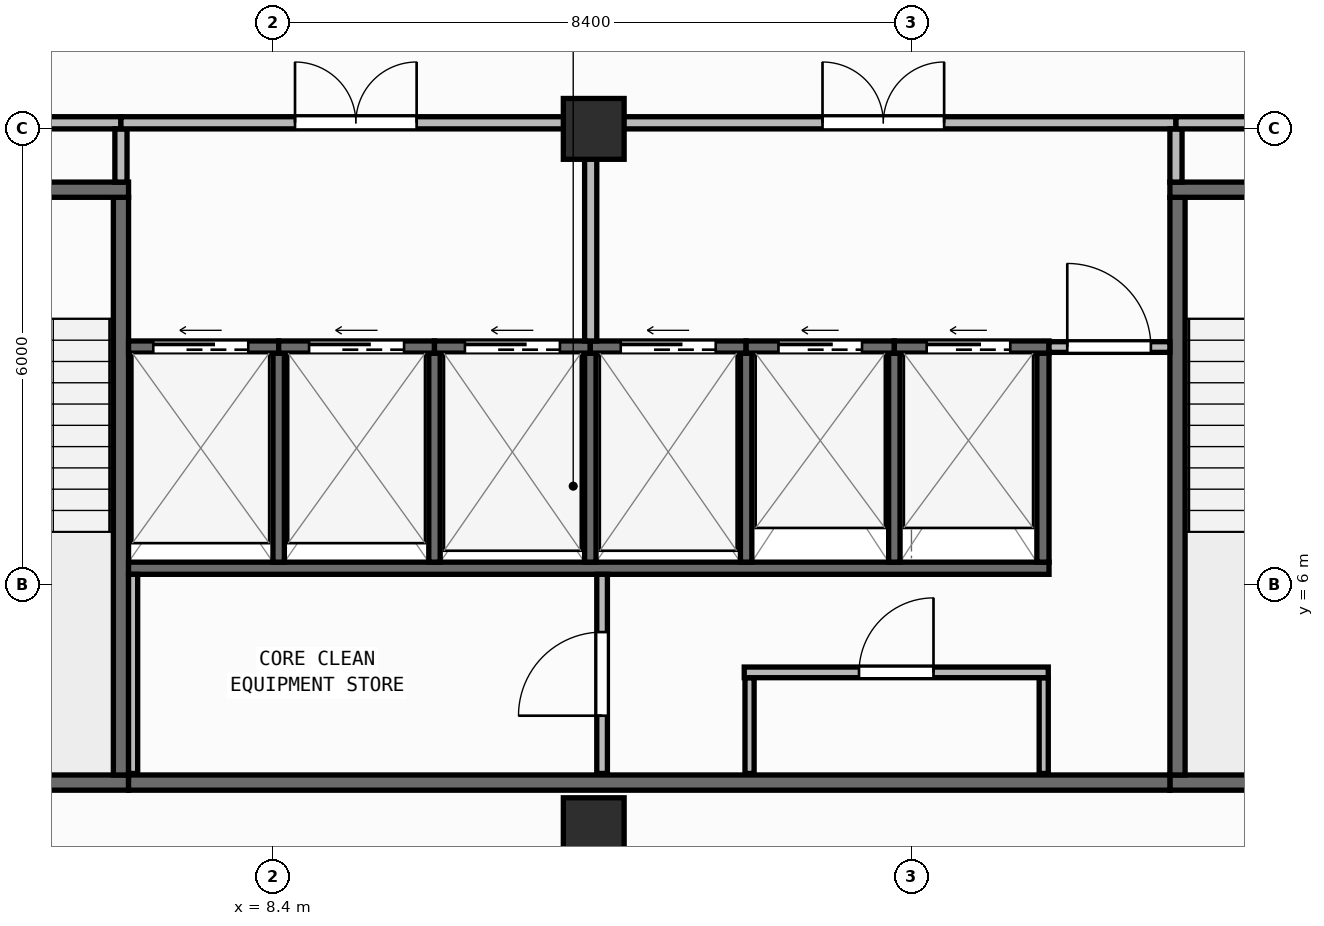
"""IFC4 building model, lengths in metres.
Left out: names, types, materials, properties, quantities, classifications, styles, units other than length and angle.
Written with IfcOpenShell. Run it as: python <this file> out.ifc"""

import sys

from ifc_helpers import new_model, si_unit, direction, frame, frame_2d, origin, origin_2d, place, context, subcontext, project, spatial, rectangle, extrude, element, fill, save


model = new_model("IFC4")
c1 = context("Model", 3, precision=1e-05, world=origin(), true_north=direction((0.0, 1.0)))
c2 = subcontext(c1, "Body", "Model", "MODEL_VIEW")
j1 = project(units=[si_unit("LENGTHUNIT", "METRE"), si_unit("PLANEANGLEUNIT", "RADIAN")], contexts=[c1])
p1 = place(None, origin())
s1 = spatial("IfcSite", under=j1, at=p1, CompositionType="ELEMENT")
p2 = place(p1, origin())
s2 = spatial("IfcBuilding", under=s1, at=p2, CompositionType="ELEMENT")
p3 = place(p2, frame((0.0, 0.0, 268.4)))
s3 = spatial("IfcBuildingStorey", under=s2, at=p3, CompositionType="ELEMENT", Elevation=268.4)
for number, where, z_axis, x_axis in (
    (1, (12.62, 2.8, 0.0), (0.0, 0.0, 1.0), (1.0, 0.0, 0.0)),
    (2, (12.62, 12.0, 0.0), (0.0, 0.0, 1.0), (1.0, 0.0, 0.0)),
):
    element("IfcColumn", number, at=place(p3, frame(where, z_axis=z_axis, x_axis=x_axis)), inside=s3, PredefinedType="COLUMN", context=c2, shape_type="SweptSolid", body=[
        extrude(rectangle(XDim=0.8, YDim=0.8, at=origin_2d()), origin(), (0.0, 0.0, 1.0), 3.95),
    ])
p4 = place(p3, frame((2.56, 0.173, 0.0), z_axis=(0.0, 0.0, 1.0), x_axis=(0.996798206282, 0.079958338856, 0.0)))
e3 = element("IfcWall", 3, at=p4, inside=s3, PredefinedType="STANDARD", context=c2, shape_type="SweptSolid", body=[
    extrude(rectangle(XDim=37.199, YDim=0.26, at=frame_2d((18.6, 0.0))), origin(), (0.0, 0.0, 1.0), 3.71),
])
p5 = place(p4, frame((17.4, 0.0, 0.9)))
e4 = element("IfcOpeningElement", 4, at=p5, cuts=e3, PredefinedType="OPENING", context=c2, shape_type="SweptSolid", body=[
    extrude(rectangle(XDim=2.4, YDim=1.65, at=frame_2d((1.2, 0.825))), frame((0.0, 0.14, 0.0), z_axis=(0.0, -1.0, 0.0), x_axis=(1.0, 0.0, 0.0)), (0.0, 0.0, 1.0), 0.28),
])
p6 = place(p3, frame((2.8, 3.4, 0.0), z_axis=(0.0, 0.0, 1.0), x_axis=(1.0, 0.0, 0.0)))
e5 = element("IfcWall", 5, at=p6, inside=s3, PredefinedType="SHEAR", context=c2, shape_type="SweptSolid", body=[
    extrude(rectangle(XDim=3.7, YDim=0.2, at=frame_2d((1.85, 0.0))), origin(), (0.0, 0.0, 1.0), 3.71),
])
p7 = place(p3, frame((6.4, 3.5, 0.0), z_axis=(0.0, 0.0, 1.0), x_axis=(0.0, 1.0, 0.0)))
e6 = element("IfcWall", 6, at=p7, inside=s3, PredefinedType="SHEAR", context=c2, shape_type="SweptSolid", body=[
    extrude(rectangle(XDim=7.6, YDim=0.2, at=frame_2d((3.8, 0.0))), origin(), (0.0, 0.0, 1.0), 3.71),
])
p8 = place(p3, frame((2.8, 11.2, 0.0), z_axis=(0.0, 0.0, 1.0), x_axis=(1.0, 0.0, 0.0)))
e7 = element("IfcWall", 7, at=p8, inside=s3, PredefinedType="SHEAR", context=c2, shape_type="SweptSolid", body=[
    extrude(rectangle(XDim=3.7, YDim=0.2, at=frame_2d((1.85, 0.0))), origin(), (0.0, 0.0, 1.0), 3.71),
])
p9 = place(p8, frame((1.2, 0.0, 0.0)))
e8 = element("IfcOpeningElement", 8, at=p9, cuts=e7, PredefinedType="OPENING", context=c2, shape_type="SweptSolid", body=[
    extrude(rectangle(XDim=1.3, YDim=2.15, at=frame_2d((0.65, 1.075))), frame((0.0, 0.11, 0.0), z_axis=(0.0, -1.0, 0.0), x_axis=(1.0, 0.0, 0.0)), (0.0, 0.0, 1.0), 0.22),
])
p10 = place(p3, frame((20.2, 3.4, 0.0), z_axis=(0.0, 0.0, 1.0), x_axis=(1.0, 0.0, 0.0)))
e9 = element("IfcWall", 9, at=p10, inside=s3, PredefinedType="SHEAR", context=c2, shape_type="SweptSolid", body=[
    extrude(rectangle(XDim=3.7, YDim=0.2, at=frame_2d((1.85, 0.0))), origin(), (0.0, 0.0, 1.0), 3.71),
])
p11 = place(p3, frame((20.3, 3.5, 0.0), z_axis=(0.0, 0.0, 1.0), x_axis=(0.0, 1.0, 0.0)))
e10 = element("IfcWall", 10, at=p11, inside=s3, PredefinedType="SHEAR", context=c2, shape_type="SweptSolid", body=[
    extrude(rectangle(XDim=7.6, YDim=0.2, at=frame_2d((3.8, 0.0))), origin(), (0.0, 0.0, 1.0), 3.71),
])
p12 = place(p3, frame((20.2, 11.2, 0.0), z_axis=(0.0, 0.0, 1.0), x_axis=(1.0, 0.0, 0.0)))
e11 = element("IfcWall", 11, at=p12, inside=s3, PredefinedType="SHEAR", context=c2, shape_type="SweptSolid", body=[
    extrude(rectangle(XDim=3.7, YDim=0.2, at=frame_2d((1.85, 0.0))), origin(), (0.0, 0.0, 1.0), 3.71),
])
p13 = place(p12, frame((1.2, 0.0, 0.0)))
e12 = element("IfcOpeningElement", 12, at=p13, cuts=e11, PredefinedType="OPENING", context=c2, shape_type="SweptSolid", body=[
    extrude(rectangle(XDim=1.3, YDim=2.15, at=frame_2d((0.65, 1.075))), frame((0.0, 0.11, 0.0), z_axis=(0.0, -1.0, 0.0), x_axis=(1.0, 0.0, 0.0)), (0.0, 0.0, 1.0), 0.22),
])
p14 = place(p3, frame((6.5, 3.4, 0.0), z_axis=(0.0, 0.0, 1.0), x_axis=(1.0, 0.0, 0.0)))
e13 = element("IfcWall", 13, at=p14, inside=s3, PredefinedType="SHEAR", context=c2, shape_type="SweptSolid", body=[
    extrude(rectangle(XDim=13.7, YDim=0.2, at=frame_2d((6.85, 0.0))), origin(), (0.0, 0.0, 1.0), 3.71),
])
p15 = place(p3, frame((6.5, 6.22, 0.0), z_axis=(0.0, 0.0, 1.0), x_axis=(1.0, 0.0, 0.0)))
e14 = element("IfcWall", 14, at=p15, inside=s3, PredefinedType="SHEAR", context=c2, shape_type="SweptSolid", body=[
    extrude(rectangle(XDim=12.11, YDim=0.16, at=frame_2d((6.055, 0.0))), origin(), (0.0, 0.0, 1.0), 3.71),
])
p16 = place(p3, frame((18.53, 6.3, 0.0), z_axis=(0.0, 0.0, 1.0), x_axis=(0.0, 1.0, 0.0)))
e15 = element("IfcWall", 15, at=p16, inside=s3, PredefinedType="SHEAR", context=c2, shape_type="SweptSolid", body=[
    extrude(rectangle(XDim=2.75, YDim=0.16, at=frame_2d((1.375, 0.0))), origin(), (0.0, 0.0, 1.0), 3.71),
])
for number, where, z_axis, x_axis in (
    (16, (8.475, 6.3, 0.0), (0.0, 0.0, 1.0), (0.0, 1.0, 0.0)),
    (17, (10.525, 6.3, 0.0), (0.0, 0.0, 1.0), (0.0, 1.0, 0.0)),
    (18, (12.575, 6.3, 0.0), (0.0, 0.0, 1.0), (0.0, 1.0, 0.0)),
    (19, (14.625, 6.3, 0.0), (0.0, 0.0, 1.0), (0.0, 1.0, 0.0)),
    (20, (16.575, 6.3, 0.0), (0.0, 0.0, 1.0), (0.0, 1.0, 0.0)),
):
    element("IfcWall", number, at=place(p3, frame(where, z_axis=z_axis, x_axis=x_axis)), inside=s3, PredefinedType="SHEAR", context=c2, shape_type="SweptSolid", body=[
        extrude(rectangle(XDim=2.75, YDim=0.15, at=frame_2d((1.375, 0.0))), origin(), (0.0, 0.0, 1.0), 3.71),
    ])
p17 = place(p3, frame((6.5, 9.13, 0.0), z_axis=(0.0, 0.0, 1.0), x_axis=(1.0, 0.0, 0.0)))
e21 = element("IfcWall", 21, at=p17, inside=s3, PredefinedType="SHEAR", context=c2, shape_type="SweptSolid", body=[
    extrude(rectangle(XDim=1.975, YDim=0.16, at=frame_2d((0.988, 0.0))), origin(), (0.0, 0.0, 1.0), 3.71),
])
p18 = place(p17, frame((0.325, 0.0, 0.0)))
e22 = element("IfcOpeningElement", 22, at=p18, cuts=e21, PredefinedType="OPENING", context=c2, shape_type="SweptSolid", body=[
    extrude(rectangle(XDim=1.25, YDim=2.15, at=frame_2d((0.625, 1.075))), frame((0.0, 0.09, 0.0), z_axis=(0.0, -1.0, 0.0), x_axis=(1.0, 0.0, 0.0)), (0.0, 0.0, 1.0), 0.18),
])
p19 = place(p3, frame((8.475, 9.13, 0.0), z_axis=(0.0, 0.0, 1.0), x_axis=(1.0, 0.0, 0.0)))
e23 = element("IfcWall", 23, at=p19, inside=s3, PredefinedType="SHEAR", context=c2, shape_type="SweptSolid", body=[
    extrude(rectangle(XDim=2.05, YDim=0.16, at=frame_2d((1.025, 0.0))), origin(), (0.0, 0.0, 1.0), 3.71),
])
p20 = place(p19, frame((0.4, 0.0, 0.0)))
e24 = element("IfcOpeningElement", 24, at=p20, cuts=e23, PredefinedType="OPENING", context=c2, shape_type="SweptSolid", body=[
    extrude(rectangle(XDim=1.25, YDim=2.15, at=frame_2d((0.625, 1.075))), frame((0.0, 0.09, 0.0), z_axis=(0.0, -1.0, 0.0), x_axis=(1.0, 0.0, 0.0)), (0.0, 0.0, 1.0), 0.18),
])
p21 = place(p3, frame((10.525, 9.13, 0.0), z_axis=(0.0, 0.0, 1.0), x_axis=(1.0, 0.0, 0.0)))
e25 = element("IfcWall", 25, at=p21, inside=s3, PredefinedType="SHEAR", context=c2, shape_type="SweptSolid", body=[
    extrude(rectangle(XDim=2.05, YDim=0.16, at=frame_2d((1.025, 0.0))), origin(), (0.0, 0.0, 1.0), 3.71),
])
p22 = place(p21, frame((0.4, 0.0, 0.0)))
e26 = element("IfcOpeningElement", 26, at=p22, cuts=e25, PredefinedType="OPENING", context=c2, shape_type="SweptSolid", body=[
    extrude(rectangle(XDim=1.25, YDim=2.15, at=frame_2d((0.625, 1.075))), frame((0.0, 0.09, 0.0), z_axis=(0.0, -1.0, 0.0), x_axis=(1.0, 0.0, 0.0)), (0.0, 0.0, 1.0), 0.18),
])
p23 = place(p3, frame((12.575, 9.13, 0.0), z_axis=(0.0, 0.0, 1.0), x_axis=(1.0, 0.0, 0.0)))
e27 = element("IfcWall", 27, at=p23, inside=s3, PredefinedType="SHEAR", context=c2, shape_type="SweptSolid", body=[
    extrude(rectangle(XDim=2.05, YDim=0.16, at=frame_2d((1.025, 0.0))), origin(), (0.0, 0.0, 1.0), 3.71),
])
p24 = place(p23, frame((0.4, 0.0, 0.0)))
e28 = element("IfcOpeningElement", 28, at=p24, cuts=e27, PredefinedType="OPENING", context=c2, shape_type="SweptSolid", body=[
    extrude(rectangle(XDim=1.25, YDim=2.15, at=frame_2d((0.625, 1.075))), frame((0.0, 0.09, 0.0), z_axis=(0.0, -1.0, 0.0), x_axis=(1.0, 0.0, 0.0)), (0.0, 0.0, 1.0), 0.18),
])
p25 = place(p3, frame((14.625, 9.13, 0.0), z_axis=(0.0, 0.0, 1.0), x_axis=(1.0, 0.0, 0.0)))
e29 = element("IfcWall", 29, at=p25, inside=s3, PredefinedType="SHEAR", context=c2, shape_type="SweptSolid", body=[
    extrude(rectangle(XDim=1.95, YDim=0.16, at=frame_2d((0.975, 0.0))), origin(), (0.0, 0.0, 1.0), 3.71),
])
p26 = place(p25, frame((0.425, 0.0, 0.0)))
e30 = element("IfcOpeningElement", 30, at=p26, cuts=e29, PredefinedType="OPENING", context=c2, shape_type="SweptSolid", body=[
    extrude(rectangle(XDim=1.1, YDim=2.15, at=frame_2d((0.55, 1.075))), frame((0.0, 0.09, 0.0), z_axis=(0.0, -1.0, 0.0), x_axis=(1.0, 0.0, 0.0)), (0.0, 0.0, 1.0), 0.18),
])
p27 = place(p3, frame((16.575, 9.13, 0.0), z_axis=(0.0, 0.0, 1.0), x_axis=(1.0, 0.0, 0.0)))
e31 = element("IfcWall", 31, at=p27, inside=s3, PredefinedType="SHEAR", context=c2, shape_type="SweptSolid", body=[
    extrude(rectangle(XDim=2.035, YDim=0.16, at=frame_2d((1.018, 0.0))), origin(), (0.0, 0.0, 1.0), 3.71),
])
p28 = place(p27, frame((0.425, 0.0, 0.0)))
e32 = element("IfcOpeningElement", 32, at=p28, cuts=e31, PredefinedType="OPENING", context=c2, shape_type="SweptSolid", body=[
    extrude(rectangle(XDim=1.1, YDim=2.15, at=frame_2d((0.55, 1.075))), frame((0.0, 0.09, 0.0), z_axis=(0.0, -1.0, 0.0), x_axis=(1.0, 0.0, 0.0)), (0.0, 0.0, 1.0), 0.18),
])
p29 = place(p3, frame((6.56, 3.52, 0.0), z_axis=(0.0, 0.0, 1.0), x_axis=(0.0, 1.0, 0.0)))
e33 = element("IfcWall", 33, at=p29, inside=s3, PredefinedType="PARTITIONING", context=c2, shape_type="SweptSolid", body=[
    extrude(rectangle(XDim=2.62, YDim=0.12, at=frame_2d((1.31, 0.0))), origin(), (0.0, 0.0, 1.0), 3.71),
])
p30 = place(p3, frame((12.73, 3.52, 0.0), z_axis=(0.0, 0.0, 1.0), x_axis=(0.0, 1.0, 0.0)))
e34 = element("IfcWall", 34, at=p30, inside=s3, PredefinedType="PARTITIONING", context=c2, shape_type="SweptSolid", body=[
    extrude(rectangle(XDim=2.62, YDim=0.14, at=frame_2d((1.31, 0.0))), origin(), (0.0, 0.0, 1.0), 3.71),
])
p31 = place(p30, frame((0.76, 0.0, 0.0)))
e35 = element("IfcOpeningElement", 35, at=p31, cuts=e34, PredefinedType="OPENING", context=c2, shape_type="SweptSolid", body=[
    extrude(rectangle(XDim=1.1, YDim=2.1, at=frame_2d((0.55, 1.05))), frame((0.0, 0.08, 0.0), z_axis=(0.0, -1.0, 0.0), x_axis=(1.0, 0.0, 0.0)), (0.0, 0.0, 1.0), 0.16),
])
for number, where, z_axis, x_axis in (
    (36, (14.67, 3.52, 0.0), (0.0, 0.0, 1.0), (0.0, 1.0, 0.0)),
    (37, (18.54, 3.52, 0.0), (0.0, 0.0, 1.0), (0.0, 1.0, 0.0)),
):
    element("IfcWall", number, at=place(p3, frame(where, z_axis=z_axis, x_axis=x_axis)), inside=s3, PredefinedType="PARTITIONING", context=c2, shape_type="SweptSolid", body=[
        extrude(rectangle(XDim=1.26, YDim=0.12, at=frame_2d((0.63, 0.0))), origin(), (0.0, 0.0, 1.0), 3.71),
    ])
p32 = place(p3, frame((14.6, 4.85, 0.0), z_axis=(0.0, 0.0, 1.0), x_axis=(1.0, 0.0, 0.0)))
e38 = element("IfcWall", 38, at=p32, inside=s3, PredefinedType="PARTITIONING", context=c2, shape_type="SweptSolid", body=[
    extrude(rectangle(XDim=4.0, YDim=0.14, at=frame_2d((2.0, 0.0))), origin(), (0.0, 0.0, 1.0), 3.71),
])
p33 = place(p32, frame((1.51, 0.0, 0.0)))
e39 = element("IfcOpeningElement", 39, at=p33, cuts=e38, PredefinedType="OPENING", context=c2, shape_type="SweptSolid", body=[
    extrude(rectangle(XDim=0.98, YDim=2.1, at=frame_2d((0.49, 1.05))), frame((0.0, 0.08, 0.0), z_axis=(0.0, -1.0, 0.0), x_axis=(1.0, 0.0, 0.0)), (0.0, 0.0, 1.0), 0.16),
])
p34 = place(p3, frame((18.61, 9.13, 0.0), z_axis=(0.0, 0.0, 1.0), x_axis=(1.0, 0.0, 0.0)))
e40 = element("IfcWall", 40, at=p34, inside=s3, PredefinedType="PARTITIONING", context=c2, shape_type="SweptSolid", body=[
    extrude(rectangle(XDim=1.59, YDim=0.14, at=frame_2d((0.795, 0.0))), origin(), (0.0, 0.0, 1.0), 3.71),
])
p35 = place(p34, frame((0.24, 0.0, 0.0)))
e41 = element("IfcOpeningElement", 41, at=p35, cuts=e40, PredefinedType="OPENING", context=c2, shape_type="SweptSolid", body=[
    extrude(rectangle(XDim=1.1, YDim=2.1, at=frame_2d((0.55, 1.05))), frame((0.0, 0.08, 0.0), z_axis=(0.0, -1.0, 0.0), x_axis=(1.0, 0.0, 0.0)), (0.0, 0.0, 1.0), 0.16),
])
p36 = place(p3, frame((2.8, 12.08, 0.0), z_axis=(0.0, 0.0, 1.0), x_axis=(1.0, 0.0, 0.0)))
e42 = element("IfcWall", 42, at=p36, inside=s3, PredefinedType="PARTITIONING", context=c2, shape_type="SweptSolid", body=[
    extrude(rectangle(XDim=3.6, YDim=0.16, at=frame_2d((1.8, 0.0))), origin(), (0.0, 0.0, 1.0), 3.157),
])
p37 = place(p36, frame((1.0, 0.0, 0.0)))
e43 = element("IfcOpeningElement", 43, at=p37, cuts=e42, PredefinedType="OPENING", context=c2, shape_type="SweptSolid", body=[
    extrude(rectangle(XDim=1.6, YDim=2.05, at=frame_2d((0.8, 1.025))), frame((0.0, 0.09, 0.0), z_axis=(0.0, -1.0, 0.0), x_axis=(1.0, 0.0, 0.0)), (0.0, 0.0, 1.0), 0.18),
])
p38 = place(p3, frame((6.4, 11.3, 0.0), z_axis=(0.0, 0.0, 1.0), x_axis=(0.0, 1.0, 0.0)))
e44 = element("IfcWall", 44, at=p38, inside=s3, PredefinedType="PARTITIONING", context=c2, shape_type="SweptSolid", body=[
    extrude(rectangle(XDim=0.7, YDim=0.16, at=frame_2d((0.35, 0.0))), origin(), (0.0, 0.0, 1.0), 3.71),
])
p39 = place(p3, frame((6.4, 12.08, 0.0), z_axis=(0.0, 0.0, 1.0), x_axis=(1.0, 0.0, 0.0)))
e45 = element("IfcWall", 45, at=p39, inside=s3, PredefinedType="PARTITIONING", context=c2, shape_type="SweptSolid", body=[
    extrude(rectangle(XDim=6.18, YDim=0.16, at=frame_2d((3.09, 0.0))), origin(), (0.0, 0.0, 1.0), 3.157),
])
p40 = place(p39, frame((2.29, 0.0, 0.0)))
e46 = element("IfcOpeningElement", 46, at=p40, cuts=e45, PredefinedType="OPENING", context=c2, shape_type="SweptSolid", body=[
    extrude(rectangle(XDim=1.6, YDim=2.05, at=frame_2d((0.8, 1.025))), frame((0.0, 0.09, 0.0), z_axis=(0.0, -1.0, 0.0), x_axis=(1.0, 0.0, 0.0)), (0.0, 0.0, 1.0), 0.18),
])
p41 = place(p3, frame((12.58, 9.21, 0.0), z_axis=(0.0, 0.0, 1.0), x_axis=(0.0, 1.0, 0.0)))
e47 = element("IfcWall", 47, at=p41, inside=s3, PredefinedType="PARTITIONING", context=c2, shape_type="SweptSolid", body=[
    extrude(rectangle(XDim=2.79, YDim=0.16, at=frame_2d((1.395, 0.0))), origin(), (0.0, 0.0, 1.0), 3.71),
])
p42 = place(p3, frame((12.58, 12.08, 0.0), z_axis=(0.0, 0.0, 1.0), x_axis=(1.0, 0.0, 0.0)))
e48 = element("IfcWall", 48, at=p42, inside=s3, PredefinedType="PARTITIONING", context=c2, shape_type="SweptSolid", body=[
    extrude(rectangle(XDim=7.7, YDim=0.16, at=frame_2d((3.85, 0.0))), origin(), (0.0, 0.0, 1.0), 3.157),
])
p43 = place(p42, frame((3.05, 0.0, 0.0)))
e49 = element("IfcOpeningElement", 49, at=p43, cuts=e48, PredefinedType="OPENING", context=c2, shape_type="SweptSolid", body=[
    extrude(rectangle(XDim=1.6, YDim=2.05, at=frame_2d((0.8, 1.025))), frame((0.0, 0.09, 0.0), z_axis=(0.0, -1.0, 0.0), x_axis=(1.0, 0.0, 0.0)), (0.0, 0.0, 1.0), 0.18),
])
p44 = place(p3, frame((20.28, 11.3, 0.0), z_axis=(0.0, 0.0, 1.0), x_axis=(0.0, 1.0, 0.0)))
e50 = element("IfcWall", 50, at=p44, inside=s3, PredefinedType="PARTITIONING", context=c2, shape_type="SweptSolid", body=[
    extrude(rectangle(XDim=0.7, YDim=0.16, at=frame_2d((0.35, 0.0))), origin(), (0.0, 0.0, 1.0), 3.71),
])
p45 = place(p3, frame((20.28, 12.08, 0.0), z_axis=(0.0, 0.0, 1.0), x_axis=(1.0, 0.0, 0.0)))
e51 = element("IfcWall", 51, at=p45, inside=s3, PredefinedType="PARTITIONING", context=c2, shape_type="SweptSolid", body=[
    extrude(rectangle(XDim=3.62, YDim=0.16, at=frame_2d((1.81, 0.0))), origin(), (0.0, 0.0, 1.0), 3.157),
])
p46 = place(p45, frame((1.01, 0.0, 0.0)))
e52 = element("IfcOpeningElement", 52, at=p46, cuts=e51, PredefinedType="OPENING", context=c2, shape_type="SweptSolid", body=[
    extrude(rectangle(XDim=1.6, YDim=2.05, at=frame_2d((0.8, 1.025))), frame((0.0, 0.09, 0.0), z_axis=(0.0, -1.0, 0.0), x_axis=(1.0, 0.0, 0.0)), (0.0, 0.0, 1.0), 0.18),
])
p47 = place(p18, origin())
e53 = element("IfcDoor", 53, at=p47, inside=s3, OperationType="SLIDING_TO_LEFT", PredefinedType="DOOR", context=c2, shape_type="SweptSolid", body=[
    extrude(rectangle(XDim=1.25, YDim=2.15, at=frame_2d((0.625, 1.075))), frame((0.0, 0.025, 0.0), z_axis=(0.0, -1.0, 0.0), x_axis=(1.0, 0.0, 0.0)), (0.0, 0.0, 1.0), 0.05),
])
fill(e22, e53)
p48 = place(p20, origin())
e54 = element("IfcDoor", 54, at=p48, inside=s3, OperationType="SLIDING_TO_LEFT", PredefinedType="DOOR", context=c2, shape_type="SweptSolid", body=[
    extrude(rectangle(XDim=1.25, YDim=2.15, at=frame_2d((0.625, 1.075))), frame((0.0, 0.025, 0.0), z_axis=(0.0, -1.0, 0.0), x_axis=(1.0, 0.0, 0.0)), (0.0, 0.0, 1.0), 0.05),
])
fill(e24, e54)
p49 = place(p22, origin())
e55 = element("IfcDoor", 55, at=p49, inside=s3, OperationType="SLIDING_TO_LEFT", PredefinedType="DOOR", context=c2, shape_type="SweptSolid", body=[
    extrude(rectangle(XDim=1.25, YDim=2.15, at=frame_2d((0.625, 1.075))), frame((0.0, 0.025, 0.0), z_axis=(0.0, -1.0, 0.0), x_axis=(1.0, 0.0, 0.0)), (0.0, 0.0, 1.0), 0.05),
])
fill(e26, e55)
p50 = place(p24, origin())
e56 = element("IfcDoor", 56, at=p50, inside=s3, OperationType="SLIDING_TO_LEFT", PredefinedType="DOOR", context=c2, shape_type="SweptSolid", body=[
    extrude(rectangle(XDim=1.25, YDim=2.15, at=frame_2d((0.625, 1.075))), frame((0.0, 0.025, 0.0), z_axis=(0.0, -1.0, 0.0), x_axis=(1.0, 0.0, 0.0)), (0.0, 0.0, 1.0), 0.05),
])
fill(e28, e56)
p51 = place(p26, origin())
e57 = element("IfcDoor", 57, at=p51, inside=s3, OperationType="SLIDING_TO_LEFT", PredefinedType="DOOR", context=c2, shape_type="SweptSolid", body=[
    extrude(rectangle(XDim=1.1, YDim=2.15, at=frame_2d((0.55, 1.075))), frame((0.0, 0.025, 0.0), z_axis=(0.0, -1.0, 0.0), x_axis=(1.0, 0.0, 0.0)), (0.0, 0.0, 1.0), 0.05),
])
fill(e30, e57)
p52 = place(p28, origin())
e58 = element("IfcDoor", 58, at=p52, inside=s3, OperationType="SLIDING_TO_LEFT", PredefinedType="DOOR", context=c2, shape_type="SweptSolid", body=[
    extrude(rectangle(XDim=1.1, YDim=2.15, at=frame_2d((0.55, 1.075))), frame((0.0, 0.025, 0.0), z_axis=(0.0, -1.0, 0.0), x_axis=(1.0, 0.0, 0.0)), (0.0, 0.0, 1.0), 0.05),
])
fill(e32, e58)
p53 = place(p31, origin())
e59 = element("IfcDoor", 59, at=p53, inside=s3, OperationType="SINGLE_SWING_LEFT", PredefinedType="DOOR", context=c2, shape_type="SweptSolid", body=[
    extrude(rectangle(XDim=1.1, YDim=2.1, at=frame_2d((0.55, 1.05))), frame((0.0, 0.025, 0.0), z_axis=(0.0, -1.0, 0.0), x_axis=(1.0, 0.0, 0.0)), (0.0, 0.0, 1.0), 0.05),
])
fill(e35, e59)
p54 = place(p33, origin())
e60 = element("IfcDoor", 60, at=p54, inside=s3, OperationType="SINGLE_SWING_RIGHT", PredefinedType="DOOR", context=c2, shape_type="SweptSolid", body=[
    extrude(rectangle(XDim=0.98, YDim=2.1, at=frame_2d((0.49, 1.05))), frame((0.0, 0.025, 0.0), z_axis=(0.0, -1.0, 0.0), x_axis=(1.0, 0.0, 0.0)), (0.0, 0.0, 1.0), 0.05),
])
fill(e39, e60)
p55 = place(p35, origin())
e61 = element("IfcDoor", 61, at=p55, inside=s3, OperationType="SINGLE_SWING_LEFT", PredefinedType="DOOR", context=c2, shape_type="SweptSolid", body=[
    extrude(rectangle(XDim=1.1, YDim=2.1, at=frame_2d((0.55, 1.05))), frame((0.0, 0.025, 0.0), z_axis=(0.0, -1.0, 0.0), x_axis=(1.0, 0.0, 0.0)), (0.0, 0.0, 1.0), 0.05),
])
fill(e41, e61)
p56 = place(p40, origin())
e62 = element("IfcDoor", 62, at=p56, inside=s3, OperationType="DOUBLE_DOOR_SINGLE_SWING", PredefinedType="DOOR", context=c2, shape_type="SweptSolid", body=[
    extrude(rectangle(XDim=1.6, YDim=2.05, at=frame_2d((0.8, 1.025))), frame((0.0, 0.025, 0.0), z_axis=(0.0, -1.0, 0.0), x_axis=(1.0, 0.0, 0.0)), (0.0, 0.0, 1.0), 0.05),
])
fill(e46, e62)
p57 = place(p43, origin())
e63 = element("IfcDoor", 63, at=p57, inside=s3, OperationType="DOUBLE_DOOR_SINGLE_SWING", PredefinedType="DOOR", context=c2, shape_type="SweptSolid", body=[
    extrude(rectangle(XDim=1.6, YDim=2.05, at=frame_2d((0.8, 1.025))), frame((0.0, 0.025, 0.0), z_axis=(0.0, -1.0, 0.0), x_axis=(1.0, 0.0, 0.0)), (0.0, 0.0, 1.0), 0.05),
])
fill(e49, e63)
save(model, sys.argv[1])
